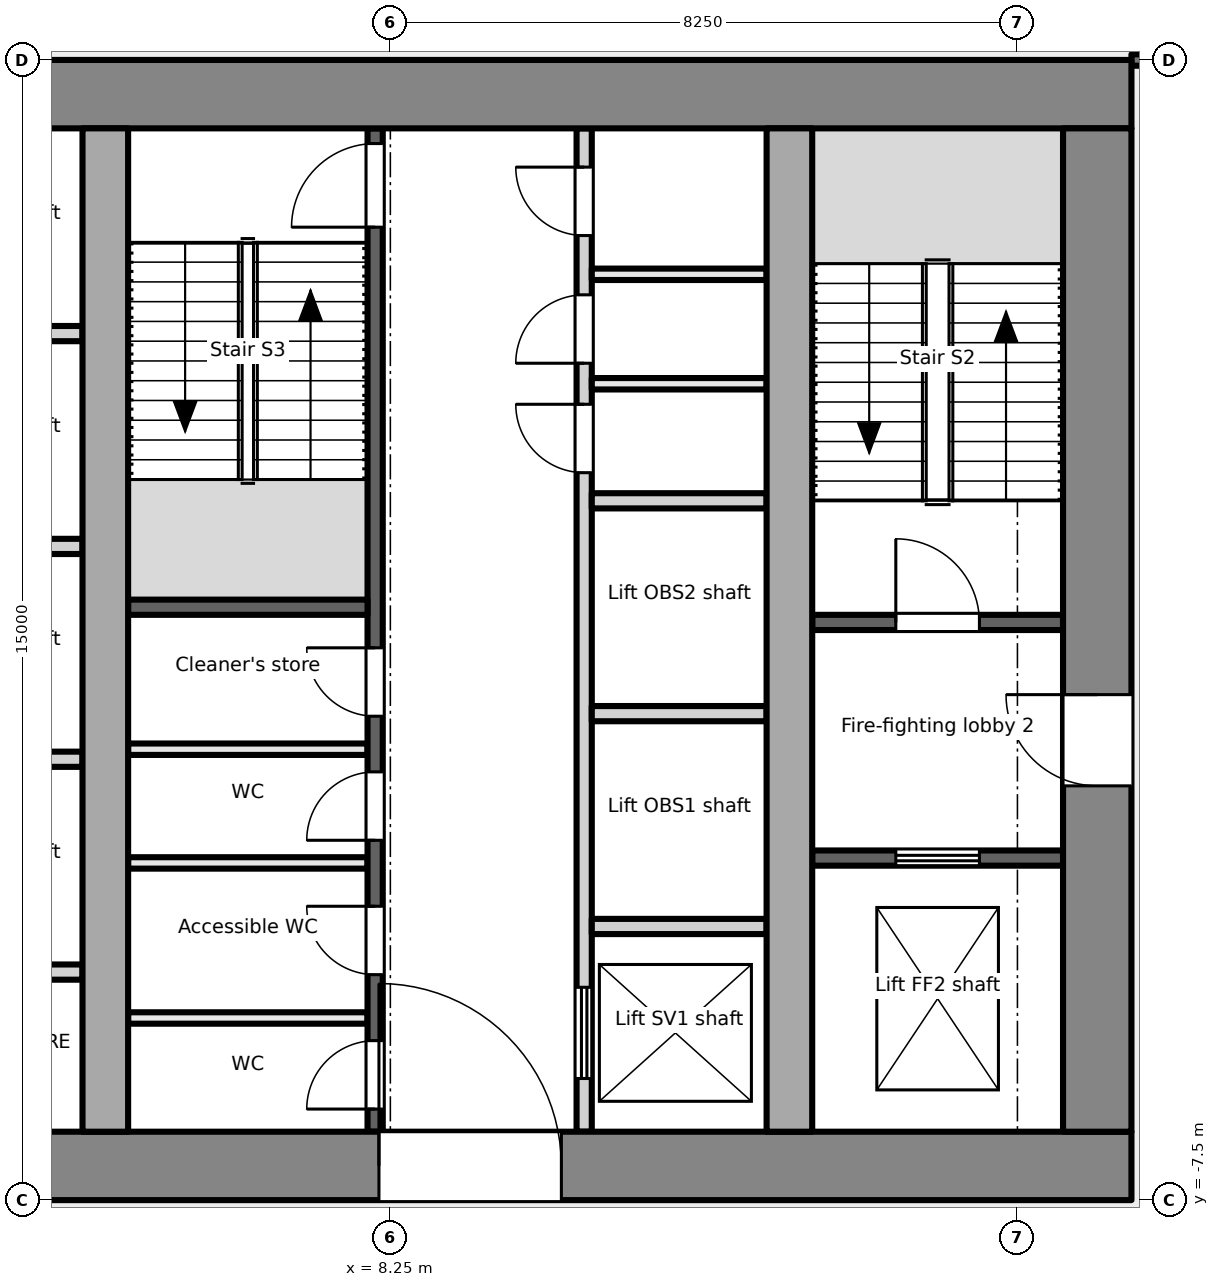
"""IFC4 building model, lengths in metres.
Left out: names, types, materials, properties, quantities, classifications, styles, units other than length and angle.
Written with IfcOpenShell. Run it as: python <this file> out.ifc"""

import sys

from ifc_helpers import new_model, si_unit, direction, frame, frame_2d, origin, place, context, subcontext, project, spatial, rectangle, extrude, element, fill, save


model = new_model("IFC4")
c1 = context("Model", 3, precision=1e-05, world=origin(), true_north=direction((0.0, 1.0)))
c2 = subcontext(c1, "Body", "Model", "MODEL_VIEW")
j1 = project(units=[si_unit("LENGTHUNIT", "METRE"), si_unit("PLANEANGLEUNIT", "RADIAN")], contexts=[c1])
p1 = place(None, origin())
s1 = spatial("IfcSite", under=j1, at=p1, CompositionType="ELEMENT")
p2 = place(p1, origin())
s2 = spatial("IfcBuilding", under=s1, at=p2, CompositionType="ELEMENT")
p3 = place(p2, frame((0.0, 0.0, 22.2)))
s3 = spatial("IfcBuildingStorey", under=s2, at=p3, CompositionType="ELEMENT", Elevation=22.2)
p4 = place(p3, frame((-18.0, -7.05, -0.2), z_axis=(0.0, 0.0, 1.0), x_axis=(1.0, 0.0, 0.0)))
e1 = element("IfcWall", 1, at=p4, inside=s3, PredefinedType="SHEAR", context=c2, shape_type="SweptSolid", body=[
    extrude(rectangle(XDim=36.0, YDim=0.9, at=frame_2d((18.0, 0.0))), origin(), (0.0, 0.0, 1.0), 4.8),
])
p5 = place(p4, frame((7.8, 0.0, 0.2)))
e2 = element("IfcOpeningElement", 2, at=p5, cuts=e1, PredefinedType="OPENING", context=c2, shape_type="SweptSolid", body=[
    extrude(rectangle(XDim=2.4, YDim=2.1, at=frame_2d((1.2, 1.05))), frame((0.0, 0.46, 0.0), z_axis=(0.0, -1.0, 0.0), x_axis=(1.0, 0.0, 0.0)), (0.0, 0.0, 1.0), 0.921),
])
p6 = place(p4, frame((17.4, 0.0, 0.2)))
e3 = element("IfcOpeningElement", 3, at=p6, cuts=e1, PredefinedType="OPENING", context=c2, shape_type="SweptSolid", body=[
    extrude(rectangle(XDim=1.2, YDim=2.1, at=frame_2d((0.6, 1.05))), frame((0.0, 0.46, 0.0), z_axis=(0.0, -1.0, 0.0), x_axis=(1.0, 0.0, 0.0)), (0.0, 0.0, 1.0), 0.921),
])
p7 = place(p4, frame((26.1, 0.0, 0.2)))
e4 = element("IfcOpeningElement", 4, at=p7, cuts=e1, PredefinedType="OPENING", context=c2, shape_type="SweptSolid", body=[
    extrude(rectangle(XDim=2.4, YDim=2.1, at=frame_2d((1.2, 1.05))), frame((0.0, 0.46, 0.0), z_axis=(0.0, -1.0, 0.0), x_axis=(1.0, 0.0, 0.0)), (0.0, 0.0, 1.0), 0.921),
])
p8 = place(p3, frame((-18.0, 7.05, -0.2), z_axis=(0.0, 0.0, 1.0), x_axis=(1.0, 0.0, 0.0)))
e5 = element("IfcWall", 5, at=p8, inside=s3, PredefinedType="SHEAR", context=c2, shape_type="SweptSolid", body=[
    extrude(rectangle(XDim=36.0, YDim=0.9, at=frame_2d((18.0, 0.0))), origin(), (0.0, 0.0, 1.0), 4.8),
])
p9 = place(p3, frame((17.55, -6.6, -0.2), z_axis=(0.0, 0.0, 1.0), x_axis=(0.0, 1.0, 0.0)))
e6 = element("IfcWall", 6, at=p9, inside=s3, PredefinedType="SHEAR", context=c2, shape_type="SweptSolid", body=[
    extrude(rectangle(XDim=13.2, YDim=0.9, at=frame_2d((6.6, 0.0))), origin(), (0.0, 0.0, 1.0), 4.8),
])
p10 = place(p9, frame((4.55, 0.0, 0.2)))
e7 = element("IfcOpeningElement", 7, at=p10, cuts=e6, PredefinedType="OPENING", context=c2, shape_type="SweptSolid", body=[
    extrude(rectangle(XDim=1.2, YDim=2.1, at=frame_2d((0.6, 1.05))), frame((0.0, 0.46, 0.0), z_axis=(0.0, -1.0, 0.0), x_axis=(1.0, 0.0, 0.0)), (0.0, 0.0, 1.0), 0.921),
])
for number, where, z_axis, x_axis in (
    (8, (4.5, -6.6, -0.2), (0.0, 0.0, 1.0), (0.0, 1.0, 0.0)),
    (9, (13.5, -6.6, -0.2), (0.0, 0.0, 1.0), (0.0, 1.0, 0.0)),
):
    element("IfcWall", number, at=place(p3, frame(where, z_axis=z_axis, x_axis=x_axis)), inside=s3, PredefinedType="SHEAR", context=c2, shape_type="SweptSolid", body=[
        extrude(rectangle(XDim=13.2, YDim=0.6, at=frame_2d((6.6, 0.0))), origin(), (0.0, 0.0, 1.0), 4.8),
    ])
p11 = place(p3, frame((13.8, -3.0, 0.0), z_axis=(0.0, 0.0, 1.0), x_axis=(1.0, 0.0, 0.0)))
e10 = element("IfcWall", 10, at=p11, inside=s3, PredefinedType="PARTITIONING", context=c2, shape_type="SweptSolid", body=[
    extrude(rectangle(XDim=3.3, YDim=0.2, at=frame_2d((1.65, 0.0))), origin(), (0.0, 0.0, 1.0), 4.6),
])
p12 = place(p11, frame((1.1, 0.0, 0.0)))
e11 = element("IfcOpeningElement", 11, at=p12, cuts=e10, PredefinedType="OPENING", context=c2, shape_type="SweptSolid", body=[
    extrude(rectangle(XDim=1.1, YDim=2.1, at=frame_2d((0.55, 1.05))), frame((0.0, 0.111, 0.0), z_axis=(0.0, -1.0, 0.0), x_axis=(1.0, 0.0, 0.0)), (0.0, 0.0, 1.0), 0.221),
])
p13 = place(p3, frame((13.8, 0.1, 0.0), z_axis=(0.0, 0.0, 1.0), x_axis=(1.0, 0.0, 0.0)))
e12 = element("IfcWall", 12, at=p13, inside=s3, PredefinedType="PARTITIONING", context=c2, shape_type="SweptSolid", body=[
    extrude(rectangle(XDim=3.3, YDim=0.2, at=frame_2d((1.65, 0.0))), origin(), (0.0, 0.0, 1.0), 4.6),
])
p14 = place(p13, frame((1.1, 0.0, 0.0)))
e13 = element("IfcOpeningElement", 13, at=p14, cuts=e12, PredefinedType="OPENING", context=c2, shape_type="SweptSolid", body=[
    extrude(rectangle(XDim=1.1, YDim=2.1, at=frame_2d((0.55, 1.05))), frame((0.0, 0.111, 0.0), z_axis=(0.0, -1.0, 0.0), x_axis=(1.0, 0.0, 0.0)), (0.0, 0.0, 1.0), 0.221),
])
for number, where, z_axis, x_axis in (
    (14, (1.9, -1.7, 0.0), (0.0, 0.0, 1.0), (1.0, 0.0, 0.0)),
    (15, (1.9, 1.1, 0.0), (0.0, 0.0, 1.0), (1.0, 0.0, 0.0)),
    (16, (1.9, 3.9, 0.0), (0.0, 0.0, 1.0), (1.0, 0.0, 0.0)),
    (17, (1.9, -4.5, 0.0), (0.0, 0.0, 1.0), (1.0, 0.0, 0.0)),
):
    element("IfcWall", number, at=place(p3, frame(where, z_axis=z_axis, x_axis=x_axis)), inside=s3, PredefinedType="PARTITIONING", context=c2, shape_type="SweptSolid", body=[
        extrude(rectangle(XDim=2.3, YDim=0.2, at=frame_2d((1.15, 0.0))), origin(), (0.0, 0.0, 1.0), 4.6),
    ])
p15 = place(p3, frame((8.05, -6.6, 0.0), z_axis=(0.0, 0.0, 1.0), x_axis=(0.0, 1.0, 0.0)))
e18 = element("IfcWall", 18, at=p15, inside=s3, PredefinedType="PARTITIONING", context=c2, shape_type="SweptSolid", body=[
    extrude(rectangle(XDim=13.2, YDim=0.2, at=frame_2d((6.6, 0.0))), origin(), (0.0, 0.0, 1.0), 4.6),
])
p16 = place(p15, frame((0.298, 0.0, 0.0)))
e19 = element("IfcOpeningElement", 19, at=p16, cuts=e18, PredefinedType="OPENING", context=c2, shape_type="SweptSolid", body=[
    extrude(rectangle(XDim=0.9, YDim=2.1, at=frame_2d((0.45, 1.05))), frame((0.0, 0.111, 0.0), z_axis=(0.0, -1.0, 0.0), x_axis=(1.0, 0.0, 0.0)), (0.0, 0.0, 1.0), 0.221),
])
p17 = place(p15, frame((2.066, 0.0, 0.0)))
e20 = element("IfcOpeningElement", 20, at=p17, cuts=e18, PredefinedType="OPENING", context=c2, shape_type="SweptSolid", body=[
    extrude(rectangle(XDim=0.9, YDim=2.1, at=frame_2d((0.45, 1.05))), frame((0.0, 0.111, 0.0), z_axis=(0.0, -1.0, 0.0), x_axis=(1.0, 0.0, 0.0)), (0.0, 0.0, 1.0), 0.221),
])
p18 = place(p15, frame((3.834, 0.0, 0.0)))
e21 = element("IfcOpeningElement", 21, at=p18, cuts=e18, PredefinedType="OPENING", context=c2, shape_type="SweptSolid", body=[
    extrude(rectangle(XDim=0.9, YDim=2.1, at=frame_2d((0.45, 1.05))), frame((0.0, 0.111, 0.0), z_axis=(0.0, -1.0, 0.0), x_axis=(1.0, 0.0, 0.0)), (0.0, 0.0, 1.0), 0.221),
])
p19 = place(p15, frame((5.466, 0.0, 0.0)))
e22 = element("IfcOpeningElement", 22, at=p19, cuts=e18, PredefinedType="OPENING", context=c2, shape_type="SweptSolid", body=[
    extrude(rectangle(XDim=0.9, YDim=2.1, at=frame_2d((0.45, 1.05))), frame((0.0, 0.111, 0.0), z_axis=(0.0, -1.0, 0.0), x_axis=(1.0, 0.0, 0.0)), (0.0, 0.0, 1.0), 0.221),
])
p20 = place(p15, frame((11.9, 0.0, 0.0)))
e23 = element("IfcOpeningElement", 23, at=p20, cuts=e18, PredefinedType="OPENING", context=c2, shape_type="SweptSolid", body=[
    extrude(rectangle(XDim=1.1, YDim=2.1, at=frame_2d((0.55, 1.05))), frame((0.0, 0.111, 0.0), z_axis=(0.0, -1.0, 0.0), x_axis=(1.0, 0.0, 0.0)), (0.0, 0.0, 1.0), 0.221),
])
p21 = place(p3, frame((10.8, -6.6, 0.0), z_axis=(0.0, 0.0, 1.0), x_axis=(0.0, 1.0, 0.0)))
e24 = element("IfcWall", 24, at=p21, inside=s3, PredefinedType="PARTITIONING", context=c2, shape_type="SweptSolid", body=[
    extrude(rectangle(XDim=13.2, YDim=0.2, at=frame_2d((6.6, 0.0))), origin(), (0.0, 0.0, 1.0), 4.6),
])
p22 = place(p21, frame((0.7, 0.0, 0.0)))
e25 = element("IfcOpeningElement", 25, at=p22, cuts=e24, PredefinedType="OPENING", context=c2, shape_type="SweptSolid", body=[
    extrude(rectangle(XDim=1.2, YDim=2.1, at=frame_2d((0.6, 1.05))), frame((0.0, 0.111, 0.0), z_axis=(0.0, -1.0, 0.0), x_axis=(1.0, 0.0, 0.0)), (0.0, 0.0, 1.0), 0.221),
])
p23 = place(p21, frame((8.67, 0.0, 0.0)))
e26 = element("IfcOpeningElement", 26, at=p23, cuts=e24, PredefinedType="OPENING", context=c2, shape_type="SweptSolid", body=[
    extrude(rectangle(XDim=0.9, YDim=2.1, at=frame_2d((0.45, 1.05))), frame((0.0, 0.111, 0.0), z_axis=(0.0, -1.0, 0.0), x_axis=(1.0, 0.0, 0.0)), (0.0, 0.0, 1.0), 0.221),
])
p24 = place(p21, frame((10.11, 0.0, 0.0)))
e27 = element("IfcOpeningElement", 27, at=p24, cuts=e24, PredefinedType="OPENING", context=c2, shape_type="SweptSolid", body=[
    extrude(rectangle(XDim=0.9, YDim=2.1, at=frame_2d((0.45, 1.05))), frame((0.0, 0.111, 0.0), z_axis=(0.0, -1.0, 0.0), x_axis=(1.0, 0.0, 0.0)), (0.0, 0.0, 1.0), 0.221),
])
p25 = place(p21, frame((11.79, 0.0, 0.0)))
e28 = element("IfcOpeningElement", 28, at=p25, cuts=e24, PredefinedType="OPENING", context=c2, shape_type="SweptSolid", body=[
    extrude(rectangle(XDim=0.9, YDim=2.1, at=frame_2d((0.45, 1.05))), frame((0.0, 0.111, 0.0), z_axis=(0.0, -1.0, 0.0), x_axis=(1.0, 0.0, 0.0)), (0.0, 0.0, 1.0), 0.221),
])
p26 = place(p3, frame((4.8, 0.3, 0.0), z_axis=(0.0, 0.0, 1.0), x_axis=(1.0, 0.0, 0.0)))
e29 = element("IfcWall", 29, at=p26, inside=s3, PredefinedType="PARTITIONING", context=c2, shape_type="SweptSolid", body=[
    extrude(rectangle(XDim=3.15, YDim=0.2, at=frame_2d((1.575, 0.0))), origin(), (0.0, 0.0, 1.0), 4.6),
])
for number, where, z_axis, x_axis in (
    (30, (4.8, -5.104, 0.0), (0.0, 0.0, 1.0), (1.0, 0.0, 0.0)),
    (31, (4.8, -3.064, 0.0), (0.0, 0.0, 1.0), (1.0, 0.0, 0.0)),
    (32, (4.8, -1.568, 0.0), (0.0, 0.0, 1.0), (1.0, 0.0, 0.0)),
):
    element("IfcWall", number, at=place(p3, frame(where, z_axis=z_axis, x_axis=x_axis)), inside=s3, PredefinedType="PARTITIONING", context=c2, shape_type="SweptSolid", body=[
        extrude(rectangle(XDim=3.15, YDim=0.15, at=frame_2d((1.575, 0.0))), origin(), (0.0, 0.0, 1.0), 4.6),
    ])
for number, where, z_axis, x_axis in (
    (33, (10.9, -3.9, 0.0), (0.0, 0.0, 1.0), (1.0, 0.0, 0.0)),
    (34, (10.9, -1.1, 0.0), (0.0, 0.0, 1.0), (1.0, 0.0, 0.0)),
    (35, (10.9, 1.7, 0.0), (0.0, 0.0, 1.0), (1.0, 0.0, 0.0)),
):
    element("IfcWall", number, at=place(p3, frame(where, z_axis=z_axis, x_axis=x_axis)), inside=s3, PredefinedType="PARTITIONING", context=c2, shape_type="SweptSolid", body=[
        extrude(rectangle(XDim=2.3, YDim=0.2, at=frame_2d((1.15, 0.0))), origin(), (0.0, 0.0, 1.0), 4.6),
    ])
for number, where, z_axis, x_axis in (
    (36, (10.9, 3.24, 0.0), (0.0, 0.0, 1.0), (1.0, 0.0, 0.0)),
    (37, (10.9, 4.68, 0.0), (0.0, 0.0, 1.0), (1.0, 0.0, 0.0)),
):
    element("IfcWall", number, at=place(p3, frame(where, z_axis=z_axis, x_axis=x_axis)), inside=s3, PredefinedType="PARTITIONING", context=c2, shape_type="SweptSolid", body=[
        extrude(rectangle(XDim=2.3, YDim=0.15, at=frame_2d((1.15, 0.0))), origin(), (0.0, 0.0, 1.0), 4.6),
    ])
p27 = place(p3, frame((18.0, 7.499, 0.0), z_axis=(0.0, 0.0, 1.0), x_axis=(1.0, 0.0, 0.0)))
e38 = element("IfcWall", 38, at=p27, inside=s3, PredefinedType="PARTITIONING", context=c2, shape_type="SweptSolid", body=[
    extrude(rectangle(XDim=2.91, YDim=0.15, at=frame_2d((1.455, 0.0))), origin(), (0.0, 0.0, 1.0), 4.6),
])
p28 = place(p27, frame((0.628, 0.0, 0.0)))
e39 = element("IfcOpeningElement", 39, at=p28, cuts=e38, PredefinedType="OPENING", context=c2, shape_type="SweptSolid", body=[
    extrude(rectangle(XDim=0.9, YDim=2.1, at=frame_2d((0.45, 1.05))), frame((0.0, 0.085, 0.0), z_axis=(0.0, -1.0, 0.0), x_axis=(1.0, 0.0, 0.0)), (0.0, 0.0, 1.0), 0.171),
])
p29 = place(p12, origin())
e40 = element("IfcDoor", 40, at=p29, inside=s3, OperationType="DOUBLE_DOOR_SLIDING", PredefinedType="DOOR", context=c2, shape_type="SweptSolid", body=[
    extrude(rectangle(XDim=1.1, YDim=2.1, at=frame_2d((0.55, 1.05))), frame((0.0, 0.025, 0.0), z_axis=(0.0, -1.0, 0.0), x_axis=(1.0, 0.0, 0.0)), (0.0, 0.0, 1.0), 0.05),
])
fill(e11, e40)
p30 = place(p10, origin())
e41 = element("IfcDoor", 41, at=p30, inside=s3, OperationType="SINGLE_SWING_RIGHT", PredefinedType="DOOR", context=c2, shape_type="SweptSolid", body=[
    extrude(rectangle(XDim=1.2, YDim=2.1, at=frame_2d((0.6, 1.05))), frame((0.0, 0.025, 0.0), z_axis=(0.0, -1.0, 0.0), x_axis=(1.0, 0.0, 0.0)), (0.0, 0.0, 1.0), 0.05),
])
fill(e7, e41)
p31 = place(p14, origin())
e42 = element("IfcDoor", 42, at=p31, inside=s3, OperationType="SINGLE_SWING_LEFT", PredefinedType="DOOR", context=c2, shape_type="SweptSolid", body=[
    extrude(rectangle(XDim=1.1, YDim=2.1, at=frame_2d((0.55, 1.05))), frame((0.0, 0.025, 0.0), z_axis=(0.0, -1.0, 0.0), x_axis=(1.0, 0.0, 0.0)), (0.0, 0.0, 1.0), 0.05),
])
fill(e13, e42)
p32 = place(p16, origin())
e43 = element("IfcDoor", 43, at=p32, inside=s3, OperationType="SINGLE_SWING_LEFT", PredefinedType="DOOR", context=c2, shape_type="SweptSolid", body=[
    extrude(rectangle(XDim=0.9, YDim=2.1, at=frame_2d((0.45, 1.05))), frame((0.0, 0.025, 0.0), z_axis=(0.0, -1.0, 0.0), x_axis=(1.0, 0.0, 0.0)), (0.0, 0.0, 1.0), 0.05),
])
fill(e19, e43)
p33 = place(p17, origin())
e44 = element("IfcDoor", 44, at=p33, inside=s3, OperationType="SINGLE_SWING_RIGHT", PredefinedType="DOOR", context=c2, shape_type="SweptSolid", body=[
    extrude(rectangle(XDim=0.9, YDim=2.1, at=frame_2d((0.45, 1.05))), frame((0.0, 0.025, 0.0), z_axis=(0.0, -1.0, 0.0), x_axis=(1.0, 0.0, 0.0)), (0.0, 0.0, 1.0), 0.05),
])
fill(e20, e44)
p34 = place(p18, origin())
e45 = element("IfcDoor", 45, at=p34, inside=s3, OperationType="SINGLE_SWING_LEFT", PredefinedType="DOOR", context=c2, shape_type="SweptSolid", body=[
    extrude(rectangle(XDim=0.9, YDim=2.1, at=frame_2d((0.45, 1.05))), frame((0.0, 0.025, 0.0), z_axis=(0.0, -1.0, 0.0), x_axis=(1.0, 0.0, 0.0)), (0.0, 0.0, 1.0), 0.05),
])
fill(e21, e45)
p35 = place(p19, origin())
e46 = element("IfcDoor", 46, at=p35, inside=s3, OperationType="SINGLE_SWING_RIGHT", PredefinedType="DOOR", context=c2, shape_type="SweptSolid", body=[
    extrude(rectangle(XDim=0.9, YDim=2.1, at=frame_2d((0.45, 1.05))), frame((0.0, 0.025, 0.0), z_axis=(0.0, -1.0, 0.0), x_axis=(1.0, 0.0, 0.0)), (0.0, 0.0, 1.0), 0.05),
])
fill(e22, e46)
p36 = place(p20, origin())
e47 = element("IfcDoor", 47, at=p36, inside=s3, OperationType="SINGLE_SWING_LEFT", PredefinedType="DOOR", context=c2, shape_type="SweptSolid", body=[
    extrude(rectangle(XDim=1.1, YDim=2.1, at=frame_2d((0.55, 1.05))), frame((0.0, 0.025, 0.0), z_axis=(0.0, -1.0, 0.0), x_axis=(1.0, 0.0, 0.0)), (0.0, 0.0, 1.0), 0.05),
])
fill(e23, e47)
p37 = place(p7, origin())
e48 = element("IfcDoor", 48, at=p37, inside=s3, OperationType="DOUBLE_DOOR_DOUBLE_SWING", PredefinedType="DOOR", context=c2, shape_type="SweptSolid", body=[
    extrude(rectangle(XDim=2.4, YDim=2.1, at=frame_2d((1.2, 1.05))), frame((0.0, 0.025, 0.0), z_axis=(0.0, -1.0, 0.0), x_axis=(1.0, 0.0, 0.0)), (0.0, 0.0, 1.0), 0.05),
])
fill(e4, e48)
p38 = place(p22, origin())
e49 = element("IfcDoor", 49, at=p38, inside=s3, OperationType="DOUBLE_DOOR_SLIDING", PredefinedType="DOOR", context=c2, shape_type="SweptSolid", body=[
    extrude(rectangle(XDim=1.2, YDim=2.1, at=frame_2d((0.6, 1.05))), frame((0.0, 0.025, 0.0), z_axis=(0.0, -1.0, 0.0), x_axis=(1.0, 0.0, 0.0)), (0.0, 0.0, 1.0), 0.05),
])
fill(e25, e49)
p39 = place(p23, origin())
e50 = element("IfcDoor", 50, at=p39, inside=s3, OperationType="SINGLE_SWING_RIGHT", PredefinedType="DOOR", context=c2, shape_type="SweptSolid", body=[
    extrude(rectangle(XDim=0.9, YDim=2.1, at=frame_2d((0.45, 1.05))), frame((0.0, 0.025, 0.0), z_axis=(0.0, -1.0, 0.0), x_axis=(1.0, 0.0, 0.0)), (0.0, 0.0, 1.0), 0.05),
])
fill(e26, e50)
p40 = place(p24, origin())
e51 = element("IfcDoor", 51, at=p40, inside=s3, OperationType="SINGLE_SWING_LEFT", PredefinedType="DOOR", context=c2, shape_type="SweptSolid", body=[
    extrude(rectangle(XDim=0.9, YDim=2.1, at=frame_2d((0.45, 1.05))), frame((0.0, 0.025, 0.0), z_axis=(0.0, -1.0, 0.0), x_axis=(1.0, 0.0, 0.0)), (0.0, 0.0, 1.0), 0.05),
])
fill(e27, e51)
p41 = place(p25, origin())
e52 = element("IfcDoor", 52, at=p41, inside=s3, OperationType="SINGLE_SWING_RIGHT", PredefinedType="DOOR", context=c2, shape_type="SweptSolid", body=[
    extrude(rectangle(XDim=0.9, YDim=2.1, at=frame_2d((0.45, 1.05))), frame((0.0, 0.025, 0.0), z_axis=(0.0, -1.0, 0.0), x_axis=(1.0, 0.0, 0.0)), (0.0, 0.0, 1.0), 0.05),
])
fill(e28, e52)
save(model, sys.argv[1])
